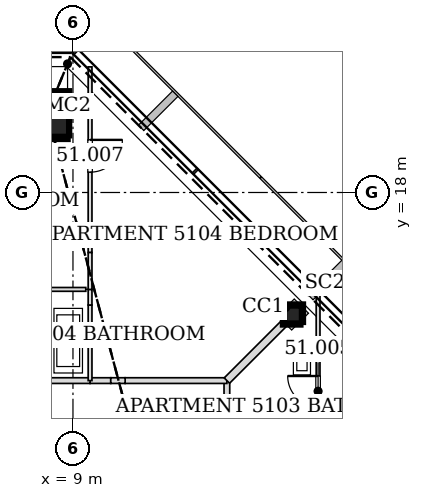
"""IFC4 building model, lengths in metres.
Left out: names, types, materials, properties, quantities, classifications, styles, units other than length and angle.
Written with IfcOpenShell. Run it as: python <this file> out.ifc"""

import sys

from ifc_helpers import new_model, si_unit, direction, frame, frame_2d, origin, origin_2d, place, context, subcontext, project, spatial, rectangle, hollow_rectangle, extrude, element, fill, save


model = new_model("IFC4")
c1 = context("Model", 3, precision=1e-05, world=origin(), true_north=direction((0.0, 1.0)))
c2 = subcontext(c1, "Body", "Model", "MODEL_VIEW")
j1 = project(units=[si_unit("LENGTHUNIT", "METRE"), si_unit("PLANEANGLEUNIT", "RADIAN")], contexts=[c1])
p1 = place(None, origin())
s1 = spatial("IfcSite", under=j1, at=p1, CompositionType="ELEMENT")
p2 = place(p1, origin())
s2 = spatial("IfcBuilding", under=s1, at=p2, CompositionType="ELEMENT")
p3 = place(p2, frame((0.0, 0.0, 221.0)))
s3 = spatial("IfcBuildingStorey", under=s2, at=p3, CompositionType="ELEMENT", Elevation=221.0)
p4 = place(p3, frame((8.319, 20.085, 0.0), z_axis=(-0.01169924247, -0.02827915051, 0.999531598986), x_axis=(0.924045401938, -0.382282742426, 0.0)))
e1 = element("IfcColumn", 1, at=p4, inside=s3, PredefinedType="COLUMN", context=c2, shape_type="SweptSolid", body=[
    extrude(hollow_rectangle(XDim=1.2, YDim=1.2, WallThickness=0.055, at=origin_2d()), origin(), (0.0, 0.0, 1.0), 3.402),
])
p5 = place(p3, frame((14.823, 14.823, 0.0), z_axis=(-0.01995470925, -0.01995470925, 0.999601730269), x_axis=(0.707106781187, -0.707106781187, 0.0)))
e2 = element("IfcColumn", 2, at=p5, inside=s3, PredefinedType="COLUMN", context=c2, shape_type="SweptSolid", body=[
    extrude(hollow_rectangle(XDim=0.5, YDim=0.5, WallThickness=0.025, at=origin_2d()), origin(), (0.0, 0.0, 1.0), 3.401),
])
p6 = place(p3, frame((13.05, 10.849, 0.0), z_axis=(0.0, 0.0, 1.0), x_axis=(0.0, 1.0, 0.0)))
e3 = element("IfcWall", 3, at=p6, inside=s3, PredefinedType="PARTITIONING", context=c2, shape_type="SweptSolid", body=[
    extrude(rectangle(XDim=2.201, YDim=0.15, at=frame_2d((1.101, 0.0))), origin(), (0.0, 0.0, 1.0), 2.578),
])
p7 = place(p3, frame((13.05, 13.05, 0.0), z_axis=(0.0, 0.0, 1.0), x_axis=(-1.0, 0.0, 0.0)))
e4 = element("IfcWall", 4, at=p7, inside=s3, PredefinedType="PARTITIONING", context=c2, shape_type="SweptSolid", body=[
    extrude(rectangle(XDim=2.677, YDim=0.15, at=frame_2d((1.339, 0.0))), origin(), (0.0, 0.0, 1.0), 2.578),
])
p8 = place(p3, frame((9.995, 13.05, 0.0), z_axis=(0.0, 0.0, 1.0), x_axis=(-1.0, 0.0, 0.0)))
e5 = element("IfcWall", 5, at=p8, inside=s3, PredefinedType="PARTITIONING", context=c2, shape_type="SweptSolid", body=[
    extrude(rectangle(XDim=0.546, YDim=0.15, at=frame_2d((0.273, 0.0))), origin(), (0.0, 0.0, 1.0), 3.2),
])
p9 = place(p3, frame((10.373, 13.05, 0.0), z_axis=(0.0, 0.0, 1.0), x_axis=(-1.0, 0.0, 0.0)))
e6 = element("IfcWall", 6, at=p9, inside=s3, PredefinedType="PARTITIONING", context=c2, shape_type="SweptSolid", body=[
    extrude(rectangle(XDim=0.378, YDim=0.15, at=frame_2d((0.189, 0.0))), origin(), (0.0, 0.0, 1.0), 2.268),
])
p10 = place(p3, frame((9.451, 13.05, 0.0), z_axis=(0.0, 0.0, 1.0), x_axis=(-1.0, 0.0, 0.0)))
e7 = element("IfcWall", 7, at=p10, inside=s3, PredefinedType="PARTITIONING", context=c2, shape_type="SweptSolid", body=[
    extrude(rectangle(XDim=2.202, YDim=0.15, at=frame_2d((1.101, 0.0))), origin(), (0.0, 0.0, 1.0), 3.2),
])
p11 = place(p3, frame((15.45, 10.85, 0.0), z_axis=(0.0, 0.0, 1.0), x_axis=(0.0, 1.0, 0.0)))
e8 = element("IfcWall", 8, at=p11, inside=s3, PredefinedType="PARTITIONING", context=c2, shape_type="SweptSolid", body=[
    extrude(rectangle(XDim=4.456, YDim=0.1, at=frame_2d((2.228, 0.0))), origin(), (0.0, 0.0, 1.0), 2.784),
])
p12 = place(p11, frame((1.521, 0.0, 0.0)))
e9 = element("IfcOpeningElement", 9, at=p12, cuts=e8, PredefinedType="OPENING", context=c2, shape_type="SweptSolid", body=[
    extrude(rectangle(XDim=0.8, YDim=2.1, at=frame_2d((0.4, 1.05))), frame((0.0, 0.06, 0.0), z_axis=(0.0, -1.0, 0.0), x_axis=(1.0, 0.0, 0.0)), (0.0, 0.0, 1.0), 0.12),
])
p13 = place(p3, frame((14.565, 14.565, 0.0), z_axis=(0.0, 0.0, 1.0), x_axis=(-0.707106781187, -0.707106781187, 0.0)))
e10 = element("IfcWall", 10, at=p13, inside=s3, PredefinedType="PARTITIONING", context=c2, shape_type="SweptSolid", body=[
    extrude(rectangle(XDim=2.142, YDim=0.2, at=frame_2d((1.071, 0.0))), origin(), (0.0, 0.0, 1.0), 2.578),
])
p14 = place(p3, frame((9.45, 15.039, 0.0), z_axis=(0.0, 0.0, 1.0), x_axis=(0.0, -1.0, 0.0)))
e11 = element("IfcWall", 11, at=p14, inside=s3, PredefinedType="PARTITIONING", context=c2, shape_type="SweptSolid", body=[
    extrude(rectangle(XDim=1.989, YDim=0.1, at=frame_2d((0.994, 0.0))), origin(), (0.0, 0.0, 1.0), 2.591),
])
p15 = place(p3, frame((9.45, 15.451, 0.0), z_axis=(0.0, 0.0, 1.0), x_axis=(0.0, -1.0, 0.0)))
e12 = element("IfcWall", 12, at=p15, inside=s3, PredefinedType="PARTITIONING", context=c2, shape_type="SweptSolid", body=[
    extrude(rectangle(XDim=0.412, YDim=0.1, at=frame_2d((0.206, 0.0))), origin(), (0.0, 0.0, 1.0), 2.268),
])
p16 = place(p3, frame((9.45, 21.306, 0.0), z_axis=(0.0, 0.0, 1.0), x_axis=(0.0, -1.0, 0.0)))
e13 = element("IfcWall", 13, at=p16, inside=s3, PredefinedType="PARTITIONING", context=c2, shape_type="SweptSolid", body=[
    extrude(rectangle(XDim=4.886, YDim=0.1, at=frame_2d((2.443, 0.0))), origin(), (0.0, 0.0, 1.0), 2.784),
])
p17 = place(p16, frame((1.921, 0.0, 0.0)))
e14 = element("IfcOpeningElement", 14, at=p17, cuts=e13, PredefinedType="OPENING", context=c2, shape_type="SweptSolid", body=[
    extrude(rectangle(XDim=0.85, YDim=2.1, at=frame_2d((0.425, 1.05))), frame((0.0, 0.06, 0.0), z_axis=(0.0, -1.0, 0.0), x_axis=(1.0, 0.0, 0.0)), (0.0, 0.0, 1.0), 0.12),
])
p18 = place(p3, frame((9.45, 16.42, 0.0), z_axis=(0.0, 0.0, 1.0), x_axis=(0.0, -1.0, 0.0)))
e15 = element("IfcWall", 15, at=p18, inside=s3, PredefinedType="PARTITIONING", context=c2, shape_type="SweptSolid", body=[
    extrude(rectangle(XDim=0.971, YDim=0.1, at=frame_2d((0.485, 0.0))), origin(), (0.0, 0.0, 1.0), 2.268),
])
p19 = place(p3, frame((9.337, 15.45, 0.0), z_axis=(0.0, 0.0, 1.0), x_axis=(-1.0, 0.0, 0.0)))
e16 = element("IfcWall", 16, at=p19, inside=s3, PredefinedType="PARTITIONING", context=c2, shape_type="SweptSolid", body=[
    extrude(rectangle(XDim=2.087, YDim=0.1, at=frame_2d((1.044, 0.0))), origin(), (0.0, 0.0, 1.0), 3.2),
])
p20 = place(p12, origin())
e17 = element("IfcDoor", 17, at=p20, inside=s3, OperationType="SINGLE_SWING_RIGHT", PredefinedType="DOOR", context=c2, shape_type="SweptSolid", body=[
    extrude(rectangle(XDim=0.8, YDim=2.1, at=frame_2d((0.4, 1.05))), frame((0.0, 0.025, 0.0), z_axis=(0.0, -1.0, 0.0), x_axis=(1.0, 0.0, 0.0)), (0.0, 0.0, 1.0), 0.05),
])
fill(e9, e17)
p21 = place(p17, origin())
e18 = element("IfcDoor", 18, at=p21, inside=s3, OperationType="SINGLE_SWING_LEFT", PredefinedType="DOOR", context=c2, shape_type="SweptSolid", body=[
    extrude(rectangle(XDim=0.85, YDim=2.1, at=frame_2d((0.425, 1.05))), frame((0.0, 0.025, 0.0), z_axis=(0.0, -1.0, 0.0), x_axis=(1.0, 0.0, 0.0)), (0.0, 0.0, 1.0), 0.05),
])
fill(e14, e18)
save(model, sys.argv[1])
